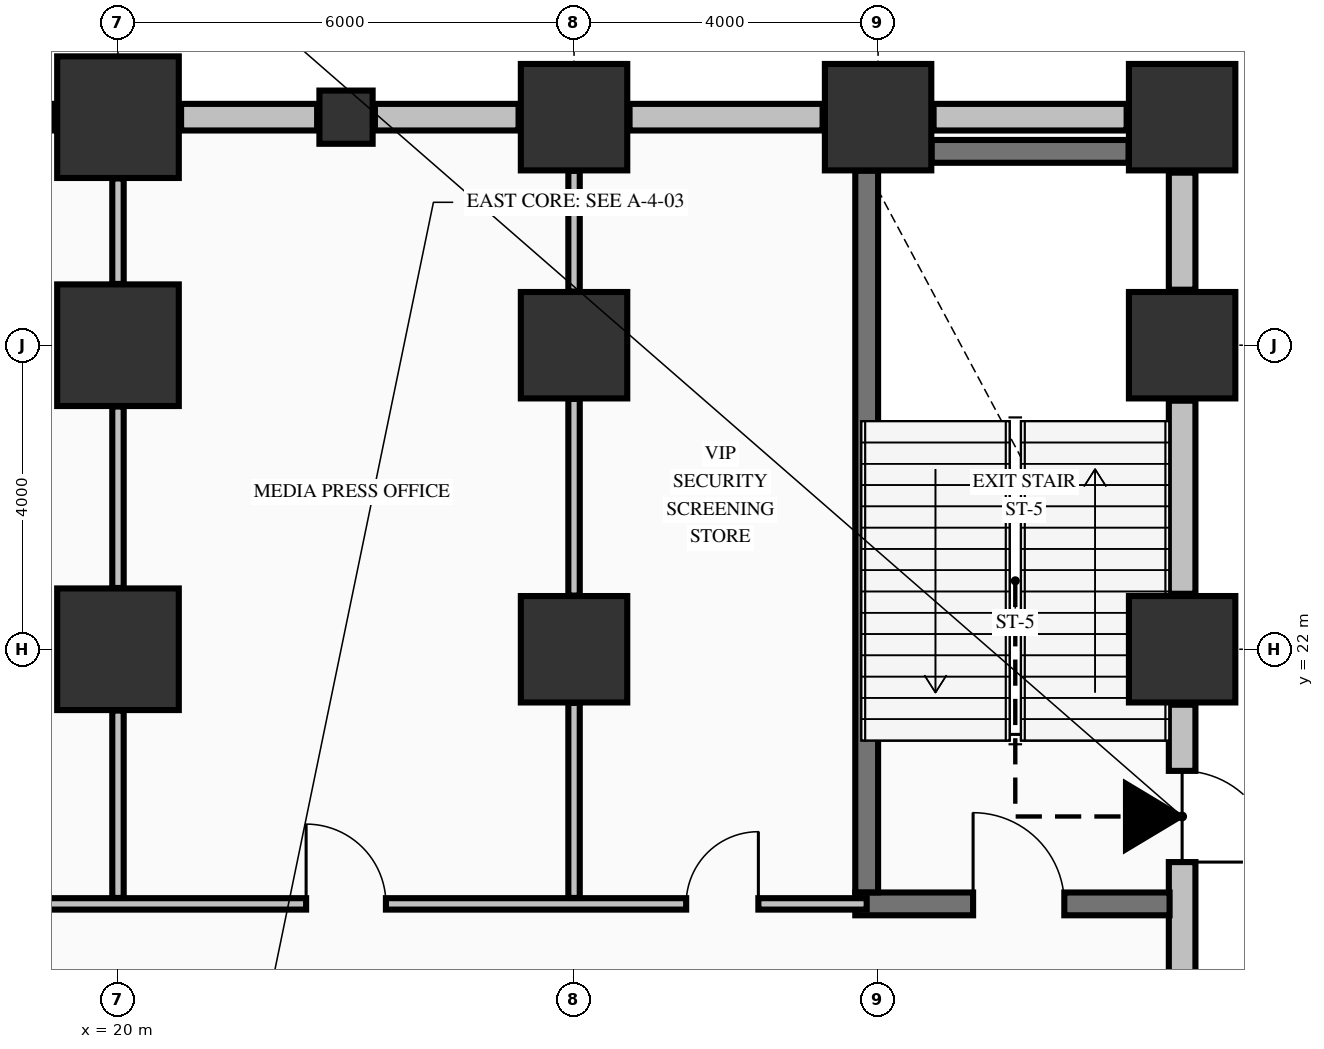
"""IFC4 building model, lengths in metres.
Left out: names, types, materials, properties, quantities, classifications, styles, units other than length and angle.
Written with IfcOpenShell. Run it as: python <this file> out.ifc"""

import sys

from ifc_helpers import new_model, si_unit, direction, frame, frame_2d, origin, origin_2d, place, context, subcontext, project, spatial, rectangle, extrude, element, fill, save


model = new_model("IFC4")
c1 = context("Model", 3, precision=1e-05, world=origin(), true_north=direction((0.0, 1.0)))
c2 = subcontext(c1, "Body", "Model", "MODEL_VIEW")
j1 = project(units=[si_unit("LENGTHUNIT", "METRE"), si_unit("PLANEANGLEUNIT", "RADIAN")], contexts=[c1])
p1 = place(None, origin())
s1 = spatial("IfcSite", under=j1, at=p1, CompositionType="ELEMENT")
p2 = place(p1, origin())
s2 = spatial("IfcBuilding", under=s1, at=p2, CompositionType="ELEMENT")
p3 = place(p2, origin())
s3 = spatial("IfcBuildingStorey", under=s2, at=p3, CompositionType="ELEMENT", Elevation=0.0)
for number, where, z_axis, x_axis in (
    (1, (20.0, 22.0, 0.0), (0.0, 0.0, 1.0), (1.0, 0.0, 0.0)),
    (2, (20.0, 26.0, 0.0), (0.0, 0.0, 1.0), (1.0, 0.0, 0.0)),
    (3, (20.0, 29.0, 0.0), (0.0, 0.0, 1.0), (1.0, 0.0, 0.0)),
):
    element("IfcColumn", number, at=place(p3, frame(where, z_axis=z_axis, x_axis=x_axis)), inside=s3, PredefinedType="COLUMN", context=c2, shape_type="SweptSolid", body=[
        extrude(rectangle(XDim=1.6, YDim=1.6, at=origin_2d()), origin(), (0.0, 0.0, 1.0), 5.09),
    ])
for number, where, z_axis, x_axis in (
    (4, (26.0, 22.0, 0.0), (0.0, 0.0, 1.0), (1.0, 0.0, 0.0)),
    (5, (26.0, 26.0, 0.0), (0.0, 0.0, 1.0), (1.0, 0.0, 0.0)),
    (6, (26.0, 29.0, 0.0), (0.0, 0.0, 1.0), (1.0, 0.0, 0.0)),
    (7, (30.0, 29.0, 0.0), (0.0, 0.0, 1.0), (1.0, 0.0, 0.0)),
    (8, (34.0, 22.0, 0.0), (0.0, 0.0, 1.0), (1.0, 0.0, 0.0)),
    (9, (34.0, 26.0, 0.0), (0.0, 0.0, 1.0), (1.0, 0.0, 0.0)),
    (10, (34.0, 29.0, 0.0), (0.0, 0.0, 1.0), (1.0, 0.0, 0.0)),
):
    element("IfcColumn", number, at=place(p3, frame(where, z_axis=z_axis, x_axis=x_axis)), inside=s3, PredefinedType="COLUMN", context=c2, shape_type="SweptSolid", body=[
        extrude(rectangle(XDim=1.4, YDim=1.4, at=origin_2d()), origin(), (0.0, 0.0, 1.0), 5.09),
    ])
p4 = place(p3, frame((23.0, 29.0, 0.0), z_axis=(0.0, 0.0, 1.0), x_axis=(1.0, 0.0, 0.0)))
e11 = element("IfcColumn", 11, at=p4, inside=s3, PredefinedType="PILASTER", context=c2, shape_type="SweptSolid", body=[
    extrude(rectangle(XDim=0.7, YDim=0.7, at=origin_2d()), origin(), (0.0, 0.0, 1.0), 5.09),
])
p5 = place(p3, frame((19.17, 29.0, 0.0), z_axis=(0.0, 0.0, 1.0), x_axis=(-1.0, 0.0, 0.0)))
e12 = element("IfcWall", 12, at=p5, inside=s3, PredefinedType="STANDARD", context=c2, shape_type="SweptSolid", body=[
    extrude(rectangle(XDim=7.34, YDim=0.35, at=frame_2d((3.67, 0.0))), origin(), (0.0, 0.0, 1.0), 4.482),
])
p6 = place(p5, frame((2.47, 0.0, 0.0)))
e13 = element("IfcOpeningElement", 13, at=p6, cuts=e12, PredefinedType="OPENING", context=c2, shape_type="SweptSolid", body=[
    extrude(rectangle(XDim=2.4, YDim=2.6, at=frame_2d((1.2, 1.3))), frame((0.0, 0.185, 0.0), z_axis=(0.0, -1.0, 0.0), x_axis=(1.0, 0.0, 0.0)), (0.0, 0.0, 1.0), 0.37),
])
p7 = place(p3, frame((22.62, 29.0, 0.0), z_axis=(0.0, 0.0, 1.0), x_axis=(-1.0, 0.0, 0.0)))
e14 = element("IfcWall", 14, at=p7, inside=s3, PredefinedType="STANDARD", context=c2, shape_type="SweptSolid", body=[
    extrude(rectangle(XDim=1.79, YDim=0.35, at=frame_2d((0.895, 0.0))), origin(), (0.0, 0.0, 1.0), 4.482),
])
p8 = place(p3, frame((25.27, 29.0, 0.0), z_axis=(0.0, 0.0, 1.0), x_axis=(-1.0, 0.0, 0.0)))
e15 = element("IfcWall", 15, at=p8, inside=s3, PredefinedType="STANDARD", context=c2, shape_type="SweptSolid", body=[
    extrude(rectangle(XDim=1.89, YDim=0.35, at=frame_2d((0.945, 0.0))), origin(), (0.0, 0.0, 1.0), 4.482),
])
for number, where, z_axis, x_axis in (
    (16, (29.27, 29.0, 0.0), (0.0, 0.0, 1.0), (-1.0, 0.0, 0.0)),
    (17, (33.27, 29.0, 0.0), (0.0, 0.0, 1.0), (-1.0, 0.0, 0.0)),
):
    element("IfcWall", number, at=place(p3, frame(where, z_axis=z_axis, x_axis=x_axis)), inside=s3, PredefinedType="STANDARD", context=c2, shape_type="SweptSolid", body=[
        extrude(rectangle(XDim=2.54, YDim=0.35, at=frame_2d((1.27, 0.0))), origin(), (0.0, 0.0, 1.0), 4.482),
    ])
p9 = place(p3, frame((34.0, 21.27, 0.0), z_axis=(0.0, 0.0, 1.0), x_axis=(0.0, -1.0, 0.0)))
e18 = element("IfcWall", 18, at=p9, inside=s3, PredefinedType="STANDARD", context=c2, shape_type="SweptSolid", body=[
    extrude(rectangle(XDim=4.54, YDim=0.35, at=frame_2d((2.27, 0.0))), origin(), (0.0, 0.0, 1.0), 5.09),
])
p10 = place(p9, frame((0.87, 0.0, 0.0)))
e19 = element("IfcOpeningElement", 19, at=p10, cuts=e18, PredefinedType="OPENING", context=c2, shape_type="SweptSolid", body=[
    extrude(rectangle(XDim=1.2, YDim=2.2, at=frame_2d((0.6, 1.1))), frame((0.0, 0.185, 0.0), z_axis=(0.0, -1.0, 0.0), x_axis=(1.0, 0.0, 0.0)), (0.0, 0.0, 1.0), 0.37),
])
p11 = place(p3, frame((34.0, 25.27, 0.0), z_axis=(0.0, 0.0, 1.0), x_axis=(0.0, -1.0, 0.0)))
e20 = element("IfcWall", 20, at=p11, inside=s3, PredefinedType="STANDARD", context=c2, shape_type="SweptSolid", body=[
    extrude(rectangle(XDim=2.54, YDim=0.35, at=frame_2d((1.27, 0.0))), origin(), (0.0, 0.0, 1.0), 5.09),
])
p12 = place(p3, frame((34.0, 28.27, 0.0), z_axis=(0.0, 0.0, 1.0), x_axis=(0.0, -1.0, 0.0)))
e21 = element("IfcWall", 21, at=p12, inside=s3, PredefinedType="STANDARD", context=c2, shape_type="SweptSolid", body=[
    extrude(rectangle(XDim=1.54, YDim=0.35, at=frame_2d((0.77, 0.0))), origin(), (0.0, 0.0, 1.0), 5.09),
])
p13 = place(p3, frame((29.7, 18.65, 0.0), z_axis=(0.0, 0.0, 1.0), x_axis=(1.0, 0.0, 0.0)))
e22 = element("IfcWall", 22, at=p13, inside=s3, PredefinedType="SHEAR", context=c2, shape_type="SweptSolid", body=[
    extrude(rectangle(XDim=4.135, YDim=0.3, at=frame_2d((2.067, 0.0))), origin(), (0.0, 0.0, 1.0), 5.09),
])
p14 = place(p13, frame((1.55, 0.0, 0.0)))
e23 = element("IfcOpeningElement", 23, at=p14, cuts=e22, PredefinedType="OPENING", context=c2, shape_type="SweptSolid", body=[
    extrude(rectangle(XDim=1.2, YDim=2.15, at=frame_2d((0.6, 1.075))), frame((0.0, 0.16, 0.0), z_axis=(0.0, -1.0, 0.0), x_axis=(1.0, 0.0, 0.0)), (0.0, 0.0, 1.0), 0.32),
])
p15 = place(p3, frame((30.704, 28.55, 0.0), z_axis=(0.0, 0.0, 1.0), x_axis=(1.0, 0.0, 0.0)))
e24 = element("IfcWall", 24, at=p15, inside=s3, PredefinedType="SHEAR", context=c2, shape_type="SweptSolid", body=[
    extrude(rectangle(XDim=2.592, YDim=0.3, at=frame_2d((1.296, 0.0))), origin(), (0.0, 0.0, 1.0), 5.09),
])
p16 = place(p3, frame((2.578, 18.65, 0.0), z_axis=(0.0, 0.0, 1.0), x_axis=(1.0, 0.0, 0.0)))
e25 = element("IfcWall", 25, at=p16, inside=s3, PredefinedType="PARTITIONING", context=c2, shape_type="SweptSolid", body=[
    extrude(rectangle(XDim=27.272, YDim=0.15, at=frame_2d((13.636, 0.0))), origin(), (0.0, 0.0, 1.0), 5.09),
])
p17 = place(p16, frame((2.322, 0.0, 0.0)))
e26 = element("IfcOpeningElement", 26, at=p17, cuts=e25, PredefinedType="OPENING", context=c2, shape_type="SweptSolid", body=[
    extrude(rectangle(XDim=1.2, YDim=2.15, at=frame_2d((0.6, 1.075))), frame((0.0, 0.085, 0.0), z_axis=(0.0, -1.0, 0.0), x_axis=(1.0, 0.0, 0.0)), (0.0, 0.0, 1.0), 0.17),
])
p18 = place(p16, frame((6.747, 0.0, 0.0)))
e27 = element("IfcOpeningElement", 27, at=p18, cuts=e25, PredefinedType="OPENING", context=c2, shape_type="SweptSolid", body=[
    extrude(rectangle(XDim=0.95, YDim=2.15, at=frame_2d((0.475, 1.075))), frame((0.0, 0.085, 0.0), z_axis=(0.0, -1.0, 0.0), x_axis=(1.0, 0.0, 0.0)), (0.0, 0.0, 1.0), 0.17),
])
p19 = place(p16, frame((12.222, 0.0, 0.0)))
e28 = element("IfcOpeningElement", 28, at=p19, cuts=e25, PredefinedType="OPENING", context=c2, shape_type="SweptSolid", body=[
    extrude(rectangle(XDim=1.4, YDim=2.2, at=frame_2d((0.7, 1.1))), frame((0.0, 0.085, 0.0), z_axis=(0.0, -1.0, 0.0), x_axis=(1.0, 0.0, 0.0)), (0.0, 0.0, 1.0), 0.17),
])
p20 = place(p16, frame((19.897, 0.0, 0.0)))
e29 = element("IfcOpeningElement", 29, at=p20, cuts=e25, PredefinedType="OPENING", context=c2, shape_type="SweptSolid", body=[
    extrude(rectangle(XDim=1.05, YDim=2.15, at=frame_2d((0.525, 1.075))), frame((0.0, 0.085, 0.0), z_axis=(0.0, -1.0, 0.0), x_axis=(1.0, 0.0, 0.0)), (0.0, 0.0, 1.0), 0.17),
])
p21 = place(p16, frame((24.897, 0.0, 0.0)))
e30 = element("IfcOpeningElement", 30, at=p21, cuts=e25, PredefinedType="OPENING", context=c2, shape_type="SweptSolid", body=[
    extrude(rectangle(XDim=0.95, YDim=2.15, at=frame_2d((0.475, 1.075))), frame((0.0, 0.085, 0.0), z_axis=(0.0, -1.0, 0.0), x_axis=(1.0, 0.0, 0.0)), (0.0, 0.0, 1.0), 0.17),
])
p22 = place(p3, frame((29.85, 18.802, 0.0), z_axis=(0.0, 0.0, 1.0), x_axis=(0.0, 1.0, 0.0)))
e31 = element("IfcWall", 31, at=p22, inside=s3, PredefinedType="SHEAR", context=c2, shape_type="SweptSolid", body=[
    extrude(rectangle(XDim=9.494, YDim=0.3, at=frame_2d((4.747, 0.0))), origin(), (0.0, 0.0, 1.0), 5.09),
])
p23 = place(p3, frame((20.0, 18.728, 0.0), z_axis=(0.0, 0.0, 1.0), x_axis=(0.0, 1.0, 0.0)))
e32 = element("IfcWall", 32, at=p23, inside=s3, PredefinedType="PARTITIONING", context=c2, shape_type="SweptSolid", body=[
    extrude(rectangle(XDim=2.466, YDim=0.15, at=frame_2d((1.233, 0.0))), origin(), (0.0, 0.0, 1.0), 4.132),
])
p24 = place(p3, frame((20.0, 22.806, 0.0), z_axis=(0.0, 0.0, 1.0), x_axis=(0.0, 1.0, 0.0)))
e33 = element("IfcWall", 33, at=p24, inside=s3, PredefinedType="PARTITIONING", context=c2, shape_type="SweptSolid", body=[
    extrude(rectangle(XDim=2.388, YDim=0.15, at=frame_2d((1.194, 0.0))), origin(), (0.0, 0.0, 1.0), 4.132),
])
p25 = place(p3, frame((20.0, 26.806, 0.0), z_axis=(0.0, 0.0, 1.0), x_axis=(0.0, 1.0, 0.0)))
e34 = element("IfcWall", 34, at=p25, inside=s3, PredefinedType="PARTITIONING", context=c2, shape_type="SweptSolid", body=[
    extrude(rectangle(XDim=1.388, YDim=0.15, at=frame_2d((0.694, 0.0))), origin(), (0.0, 0.0, 1.0), 4.132),
])
p26 = place(p3, frame((26.0, 18.728, 0.0), z_axis=(0.0, 0.0, 1.0), x_axis=(0.0, 1.0, 0.0)))
e35 = element("IfcWall", 35, at=p26, inside=s3, PredefinedType="PARTITIONING", context=c2, shape_type="SweptSolid", body=[
    extrude(rectangle(XDim=2.566, YDim=0.15, at=frame_2d((1.283, 0.0))), origin(), (0.0, 0.0, 1.0), 4.132),
])
p27 = place(p3, frame((26.0, 22.706, 0.0), z_axis=(0.0, 0.0, 1.0), x_axis=(0.0, 1.0, 0.0)))
e36 = element("IfcWall", 36, at=p27, inside=s3, PredefinedType="PARTITIONING", context=c2, shape_type="SweptSolid", body=[
    extrude(rectangle(XDim=2.588, YDim=0.15, at=frame_2d((1.294, 0.0))), origin(), (0.0, 0.0, 1.0), 4.132),
])
p28 = place(p3, frame((26.0, 26.706, 0.0), z_axis=(0.0, 0.0, 1.0), x_axis=(0.0, 1.0, 0.0)))
e37 = element("IfcWall", 37, at=p28, inside=s3, PredefinedType="PARTITIONING", context=c2, shape_type="SweptSolid", body=[
    extrude(rectangle(XDim=1.588, YDim=0.15, at=frame_2d((0.794, 0.0))), origin(), (0.0, 0.0, 1.0), 4.132),
])
p29 = place(p10, origin())
e38 = element("IfcDoor", 38, at=p29, inside=s3, OperationType="SINGLE_SWING_RIGHT", PredefinedType="DOOR", context=c2, shape_type="SweptSolid", body=[
    extrude(rectangle(XDim=1.2, YDim=2.2, at=frame_2d((0.6, 1.1))), frame((0.0, 0.025, 0.0), z_axis=(0.0, -1.0, 0.0), x_axis=(1.0, 0.0, 0.0)), (0.0, 0.0, 1.0), 0.05),
])
fill(e19, e38)
p30 = place(p14, origin())
e39 = element("IfcDoor", 39, at=p30, inside=s3, OperationType="SINGLE_SWING_LEFT", PredefinedType="DOOR", context=c2, shape_type="SweptSolid", body=[
    extrude(rectangle(XDim=1.2, YDim=2.15, at=frame_2d((0.6, 1.075))), frame((0.0, 0.025, 0.0), z_axis=(0.0, -1.0, 0.0), x_axis=(1.0, 0.0, 0.0)), (0.0, 0.0, 1.0), 0.05),
])
fill(e23, e39)
p31 = place(p20, origin())
e40 = element("IfcDoor", 40, at=p31, inside=s3, OperationType="SINGLE_SWING_LEFT", PredefinedType="DOOR", context=c2, shape_type="SweptSolid", body=[
    extrude(rectangle(XDim=1.05, YDim=2.15, at=frame_2d((0.525, 1.075))), frame((0.0, 0.025, 0.0), z_axis=(0.0, -1.0, 0.0), x_axis=(1.0, 0.0, 0.0)), (0.0, 0.0, 1.0), 0.05),
])
fill(e29, e40)
p32 = place(p21, origin())
e41 = element("IfcDoor", 41, at=p32, inside=s3, OperationType="SINGLE_SWING_RIGHT", PredefinedType="DOOR", context=c2, shape_type="SweptSolid", body=[
    extrude(rectangle(XDim=0.95, YDim=2.15, at=frame_2d((0.475, 1.075))), frame((0.0, 0.025, 0.0), z_axis=(0.0, -1.0, 0.0), x_axis=(1.0, 0.0, 0.0)), (0.0, 0.0, 1.0), 0.05),
])
fill(e30, e41)
save(model, sys.argv[1])
